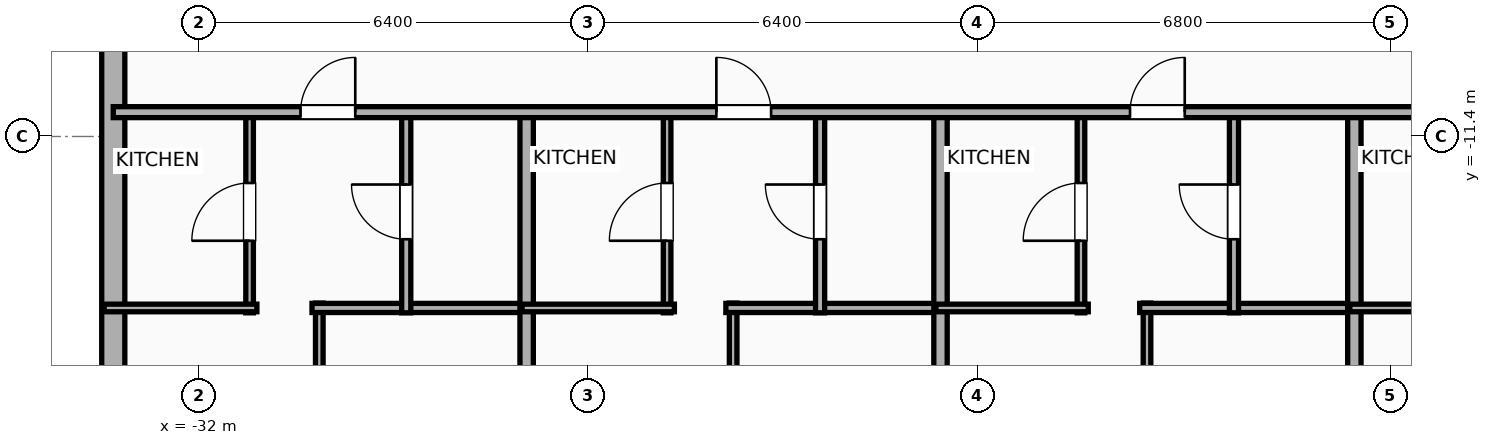
"""IFC4 building model, lengths in metres.
Left out: names, types, materials, properties, quantities, classifications, styles, units other than length and angle.
Written with IfcOpenShell. Run it as: python <this file> out.ifc"""

import sys

from ifc_helpers import new_model, si_unit, direction, frame, frame_2d, origin, place, context, subcontext, project, spatial, rectangle, extrude, element, fill, save


model = new_model("IFC4")
c1 = context("Model", 3, precision=1e-05, world=origin(), true_north=direction((0.0, 1.0)))
c2 = subcontext(c1, "Body", "Model", "MODEL_VIEW")
j1 = project(units=[si_unit("LENGTHUNIT", "METRE"), si_unit("PLANEANGLEUNIT", "RADIAN")], contexts=[c1])
p1 = place(None, origin())
s1 = spatial("IfcSite", under=j1, at=p1, CompositionType="ELEMENT")
p2 = place(p1, origin())
s2 = spatial("IfcBuilding", under=s1, at=p2, CompositionType="ELEMENT")
p3 = place(p2, frame((0.0, 0.0, 65.0)))
s3 = spatial("IfcBuildingStorey", under=s2, at=p3, CompositionType="ELEMENT", Elevation=65.0)
p4 = place(p3, frame((-33.41, -18.381, 0.0), z_axis=(0.0, 0.0, 1.0), x_axis=(0.0, 1.0, 0.0)))
e1 = element("IfcWall", 1, at=p4, inside=s3, PredefinedType="ELEMENTEDWALL", context=c2, shape_type="SweptSolid", body=[
    extrude(rectangle(XDim=36.763, YDim=0.38, at=frame_2d((18.381, 0.0))), origin(), (0.0, 0.0, 1.0), 3.65),
])
p5 = place(p4, frame((33.637, 0.0, 0.75)))
e2 = element("IfcOpeningElement", 2, at=p5, cuts=e1, PredefinedType="OPENING", context=c2, shape_type="SweptSolid", body=[
    extrude(rectangle(XDim=1.2, YDim=2.05, at=frame_2d((0.6, 1.025))), frame((0.0, 0.2, 0.0), z_axis=(0.0, -1.0, 0.0), x_axis=(1.0, 0.0, 0.0)), (0.0, 0.0, 1.0), 0.4),
])
p6 = place(p4, frame((22.576, 0.0, 0.75)))
e3 = element("IfcOpeningElement", 3, at=p6, cuts=e1, PredefinedType="OPENING", context=c2, shape_type="SweptSolid", body=[
    extrude(rectangle(XDim=1.2, YDim=2.05, at=frame_2d((0.6, 1.025))), frame((0.0, 0.2, 0.0), z_axis=(0.0, -1.0, 0.0), x_axis=(1.0, 0.0, 0.0)), (0.0, 0.0, 1.0), 0.4),
])
p7 = place(p4, frame((13.126, 0.0, 0.75)))
e4 = element("IfcOpeningElement", 4, at=p7, cuts=e1, PredefinedType="OPENING", context=c2, shape_type="SweptSolid", body=[
    extrude(rectangle(XDim=1.2, YDim=2.05, at=frame_2d((0.6, 1.025))), frame((0.0, 0.2, 0.0), z_axis=(0.0, -1.0, 0.0), x_axis=(1.0, 0.0, 0.0)), (0.0, 0.0, 1.0), 0.4),
])
p8 = place(p3, frame((-30.022, -22.275, 0.0), z_axis=(0.0, 0.0, 1.0), x_axis=(0.0, 1.0, 0.0)))
e5 = element("IfcWall", 5, at=p8, inside=s3, PredefinedType="PARTITIONING", context=c2, shape_type="SweptSolid", body=[
    extrude(rectangle(XDim=8.135, YDim=0.125, at=frame_2d((4.068, 0.0))), origin(), (0.0, 0.0, 1.0), 2.94),
])
p9 = place(p8, frame((5.733, 0.0, 0.0)))
e6 = element("IfcOpeningElement", 6, at=p9, cuts=e5, PredefinedType="OPENING", context=c2, shape_type="SweptSolid", body=[
    extrude(rectangle(XDim=0.9, YDim=2.05, at=frame_2d((0.45, 1.025))), frame((0.0, 0.073, 0.0), z_axis=(0.0, -1.0, 0.0), x_axis=(1.0, 0.0, 0.0)), (0.0, 0.0, 1.0), 0.145),
])
p10 = place(p3, frame((-30.142, -14.22, 0.0), z_axis=(0.0, 0.0, 1.0), x_axis=(1.0, 0.0, 0.0)))
e7 = element("IfcWall", 7, at=p10, inside=s3, PredefinedType="PLUMBINGWALL", context=c2, shape_type="SweptSolid", body=[
    extrude(rectangle(XDim=3.605, YDim=0.15, at=frame_2d((1.802, 0.0))), origin(), (0.0, 0.0, 1.0), 3.65),
])
p11 = place(p3, frame((-31.168, -14.3, 0.0), z_axis=(0.0, 0.0, 1.0), x_axis=(0.0, 1.0, 0.0)))
e8 = element("IfcWall", 8, at=p11, inside=s3, PredefinedType="PARTITIONING", context=c2, shape_type="SweptSolid", body=[
    extrude(rectangle(XDim=3.32, YDim=0.125, at=frame_2d((1.66, 0.0))), origin(), (0.0, 0.0, 1.0), 2.94),
])
p12 = place(p11, frame((1.185, 0.0, 0.0)))
e9 = element("IfcOpeningElement", 9, at=p12, cuts=e8, PredefinedType="OPENING", context=c2, shape_type="SweptSolid", body=[
    extrude(rectangle(XDim=0.95, YDim=2.05, at=frame_2d((0.475, 1.025))), frame((0.0, 0.073, 0.0), z_axis=(0.0, -1.0, 0.0), x_axis=(1.0, 0.0, 0.0)), (0.0, 0.0, 1.0), 0.145),
])
p13 = place(p3, frame((-33.56, -14.22, 0.0), z_axis=(0.0, 0.0, 1.0), x_axis=(1.0, 0.0, 0.0)))
e10 = element("IfcWall", 10, at=p13, inside=s3, PredefinedType="PARTITIONING", context=c2, shape_type="SweptSolid", body=[
    extrude(rectangle(XDim=2.512, YDim=0.125, at=frame_2d((1.256, 0.0))), origin(), (0.0, 0.0, 1.0), 3.65),
])
p14 = place(p3, frame((-28.592, -14.3, 0.0), z_axis=(0.0, 0.0, 1.0), x_axis=(0.0, 1.0, 0.0)))
e11 = element("IfcWall", 11, at=p14, inside=s3, PredefinedType="PLUMBINGWALL", context=c2, shape_type="SweptSolid", body=[
    extrude(rectangle(XDim=3.32, YDim=0.15, at=frame_2d((1.66, 0.0))), origin(), (0.0, 0.0, 1.0), 3.65),
])
p15 = place(p14, frame((1.21, 0.0, 0.0)))
e12 = element("IfcOpeningElement", 12, at=p15, cuts=e11, PredefinedType="OPENING", context=c2, shape_type="SweptSolid", body=[
    extrude(rectangle(XDim=0.9, YDim=2.05, at=frame_2d((0.45, 1.025))), frame((0.0, 0.085, 0.0), z_axis=(0.0, -1.0, 0.0), x_axis=(1.0, 0.0, 0.0)), (0.0, 0.0, 1.0), 0.17),
])
p16 = place(p3, frame((-26.612, -22.21, 0.0), z_axis=(0.0, 0.0, 1.0), x_axis=(0.0, 1.0, 0.0)))
e13 = element("IfcWall", 13, at=p16, inside=s3, PredefinedType="PARTITIONING", context=c2, shape_type="SweptSolid", body=[
    extrude(rectangle(XDim=11.29, YDim=0.22, at=frame_2d((5.645, 0.0))), origin(), (0.0, 0.0, 1.0), 3.65),
])
p17 = place(p3, frame((-23.216, -22.36, 0.0), z_axis=(0.0, 0.0, 1.0), x_axis=(0.0, 1.0, 0.0)))
e14 = element("IfcWall", 14, at=p17, inside=s3, PredefinedType="PARTITIONING", context=c2, shape_type="SweptSolid", body=[
    extrude(rectangle(XDim=8.22, YDim=0.125, at=frame_2d((4.11, 0.0))), origin(), (0.0, 0.0, 1.0), 3.65),
])
p18 = place(p17, frame((5.797, 0.0, 0.0)))
e15 = element("IfcOpeningElement", 15, at=p18, cuts=e14, PredefinedType="OPENING", context=c2, shape_type="SweptSolid", body=[
    extrude(rectangle(XDim=0.9, YDim=2.05, at=frame_2d((0.45, 1.025))), frame((0.0, 0.073, 0.0), z_axis=(0.0, -1.0, 0.0), x_axis=(1.0, 0.0, 0.0)), (0.0, 0.0, 1.0), 0.145),
])
p19 = place(p3, frame((-23.336, -14.22, 0.0), z_axis=(0.0, 0.0, 1.0), x_axis=(1.0, 0.0, 0.0)))
e16 = element("IfcWall", 16, at=p19, inside=s3, PredefinedType="PLUMBINGWALL", context=c2, shape_type="SweptSolid", body=[
    extrude(rectangle(XDim=3.605, YDim=0.15, at=frame_2d((1.802, 0.0))), origin(), (0.0, 0.0, 1.0), 3.65),
])
p20 = place(p3, frame((-24.302, -14.3, 0.0), z_axis=(0.0, 0.0, 1.0), x_axis=(0.0, 1.0, 0.0)))
e17 = element("IfcWall", 17, at=p20, inside=s3, PredefinedType="PARTITIONING", context=c2, shape_type="SweptSolid", body=[
    extrude(rectangle(XDim=3.32, YDim=0.125, at=frame_2d((1.66, 0.0))), origin(), (0.0, 0.0, 1.0), 3.65),
])
p21 = place(p20, frame((1.185, 0.0, 0.0)))
e18 = element("IfcOpeningElement", 18, at=p21, cuts=e17, PredefinedType="OPENING", context=c2, shape_type="SweptSolid", body=[
    extrude(rectangle(XDim=0.95, YDim=2.05, at=frame_2d((0.475, 1.025))), frame((0.0, 0.073, 0.0), z_axis=(0.0, -1.0, 0.0), x_axis=(1.0, 0.0, 0.0)), (0.0, 0.0, 1.0), 0.145),
])
p22 = place(p3, frame((-26.687, -14.22, 0.0), z_axis=(0.0, 0.0, 1.0), x_axis=(1.0, 0.0, 0.0)))
e19 = element("IfcWall", 19, at=p22, inside=s3, PredefinedType="PARTITIONING", context=c2, shape_type="SweptSolid", body=[
    extrude(rectangle(XDim=2.505, YDim=0.125, at=frame_2d((1.252, 0.0))), origin(), (0.0, 0.0, 1.0), 3.65),
])
p23 = place(p3, frame((-21.786, -14.3, 0.0), z_axis=(0.0, 0.0, 1.0), x_axis=(0.0, 1.0, 0.0)))
e20 = element("IfcWall", 20, at=p23, inside=s3, PredefinedType="PLUMBINGWALL", context=c2, shape_type="SweptSolid", body=[
    extrude(rectangle(XDim=3.32, YDim=0.15, at=frame_2d((1.66, 0.0))), origin(), (0.0, 0.0, 1.0), 3.65),
])
p24 = place(p23, frame((1.21, 0.0, 0.0)))
e21 = element("IfcOpeningElement", 21, at=p24, cuts=e20, PredefinedType="OPENING", context=c2, shape_type="SweptSolid", body=[
    extrude(rectangle(XDim=0.9, YDim=2.05, at=frame_2d((0.45, 1.025))), frame((0.0, 0.085, 0.0), z_axis=(0.0, -1.0, 0.0), x_axis=(1.0, 0.0, 0.0)), (0.0, 0.0, 1.0), 0.17),
])
p25 = place(p3, frame((-19.806, -22.21, 0.0), z_axis=(0.0, 0.0, 1.0), x_axis=(0.0, 1.0, 0.0)))
e22 = element("IfcWall", 22, at=p25, inside=s3, PredefinedType="PARTITIONING", context=c2, shape_type="SweptSolid", body=[
    extrude(rectangle(XDim=11.29, YDim=0.22, at=frame_2d((5.645, 0.0))), origin(), (0.0, 0.0, 1.0), 3.65),
])
p26 = place(p3, frame((-16.41, -22.36, 0.0), z_axis=(0.0, 0.0, 1.0), x_axis=(0.0, 1.0, 0.0)))
e23 = element("IfcWall", 23, at=p26, inside=s3, PredefinedType="PARTITIONING", context=c2, shape_type="SweptSolid", body=[
    extrude(rectangle(XDim=8.22, YDim=0.125, at=frame_2d((4.11, 0.0))), origin(), (0.0, 0.0, 1.0), 3.65),
])
p27 = place(p26, frame((5.797, 0.0, 0.0)))
e24 = element("IfcOpeningElement", 24, at=p27, cuts=e23, PredefinedType="OPENING", context=c2, shape_type="SweptSolid", body=[
    extrude(rectangle(XDim=0.9, YDim=2.05, at=frame_2d((0.45, 1.025))), frame((0.0, 0.073, 0.0), z_axis=(0.0, -1.0, 0.0), x_axis=(1.0, 0.0, 0.0)), (0.0, 0.0, 1.0), 0.145),
])
p28 = place(p3, frame((-16.53, -14.22, 0.0), z_axis=(0.0, 0.0, 1.0), x_axis=(1.0, 0.0, 0.0)))
e25 = element("IfcWall", 25, at=p28, inside=s3, PredefinedType="PLUMBINGWALL", context=c2, shape_type="SweptSolid", body=[
    extrude(rectangle(XDim=3.605, YDim=0.15, at=frame_2d((1.802, 0.0))), origin(), (0.0, 0.0, 1.0), 3.65),
])
p29 = place(p3, frame((-17.496, -14.3, 0.0), z_axis=(0.0, 0.0, 1.0), x_axis=(0.0, 1.0, 0.0)))
e26 = element("IfcWall", 26, at=p29, inside=s3, PredefinedType="PARTITIONING", context=c2, shape_type="SweptSolid", body=[
    extrude(rectangle(XDim=3.32, YDim=0.125, at=frame_2d((1.66, 0.0))), origin(), (0.0, 0.0, 1.0), 3.65),
])
p30 = place(p29, frame((1.185, 0.0, 0.0)))
e27 = element("IfcOpeningElement", 27, at=p30, cuts=e26, PredefinedType="OPENING", context=c2, shape_type="SweptSolid", body=[
    extrude(rectangle(XDim=0.95, YDim=2.05, at=frame_2d((0.475, 1.025))), frame((0.0, 0.073, 0.0), z_axis=(0.0, -1.0, 0.0), x_axis=(1.0, 0.0, 0.0)), (0.0, 0.0, 1.0), 0.145),
])
p31 = place(p3, frame((-19.881, -14.22, 0.0), z_axis=(0.0, 0.0, 1.0), x_axis=(1.0, 0.0, 0.0)))
e28 = element("IfcWall", 28, at=p31, inside=s3, PredefinedType="PARTITIONING", context=c2, shape_type="SweptSolid", body=[
    extrude(rectangle(XDim=2.505, YDim=0.125, at=frame_2d((1.252, 0.0))), origin(), (0.0, 0.0, 1.0), 3.65),
])
p32 = place(p3, frame((-14.98, -14.3, 0.0), z_axis=(0.0, 0.0, 1.0), x_axis=(0.0, 1.0, 0.0)))
e29 = element("IfcWall", 29, at=p32, inside=s3, PredefinedType="PLUMBINGWALL", context=c2, shape_type="SweptSolid", body=[
    extrude(rectangle(XDim=3.32, YDim=0.15, at=frame_2d((1.66, 0.0))), origin(), (0.0, 0.0, 1.0), 3.65),
])
p33 = place(p32, frame((1.21, 0.0, 0.0)))
e30 = element("IfcOpeningElement", 30, at=p33, cuts=e29, PredefinedType="OPENING", context=c2, shape_type="SweptSolid", body=[
    extrude(rectangle(XDim=0.9, YDim=2.05, at=frame_2d((0.45, 1.025))), frame((0.0, 0.085, 0.0), z_axis=(0.0, -1.0, 0.0), x_axis=(1.0, 0.0, 0.0)), (0.0, 0.0, 1.0), 0.17),
])
p34 = place(p3, frame((-13.0, -22.21, 0.0), z_axis=(0.0, 0.0, 1.0), x_axis=(0.0, 1.0, 0.0)))
e31 = element("IfcWall", 31, at=p34, inside=s3, PredefinedType="PARTITIONING", context=c2, shape_type="SweptSolid", body=[
    extrude(rectangle(XDim=11.29, YDim=0.22, at=frame_2d((5.645, 0.0))), origin(), (0.0, 0.0, 1.0), 3.65),
])
p35 = place(p3, frame((-13.075, -14.22, 0.0), z_axis=(0.0, 0.0, 1.0), x_axis=(1.0, 0.0, 0.0)))
e32 = element("IfcWall", 32, at=p35, inside=s3, PredefinedType="PARTITIONING", context=c2, shape_type="SweptSolid", body=[
    extrude(rectangle(XDim=2.505, YDim=0.125, at=frame_2d((1.252, 0.0))), origin(), (0.0, 0.0, 1.0), 3.65),
])
p36 = place(p3, frame((-33.41, -11.0, 0.0), z_axis=(0.0, 0.0, 1.0), x_axis=(1.0, 0.0, 0.0)))
e33 = element("IfcWall", 33, at=p36, inside=s3, PredefinedType="PARTITIONING", context=c2, shape_type="SweptSolid", body=[
    extrude(rectangle(XDim=59.62, YDim=0.18, at=frame_2d((29.81, 0.0))), origin(), (0.0, 0.0, 1.0), 3.65),
])
p37 = place(p36, frame((3.08, 0.0, 0.0)))
e34 = element("IfcOpeningElement", 34, at=p37, cuts=e33, PredefinedType="OPENING", context=c2, shape_type="SweptSolid", body=[
    extrude(rectangle(XDim=0.9, YDim=2.05, at=frame_2d((0.45, 1.025))), frame((0.0, 0.1, 0.0), z_axis=(0.0, -1.0, 0.0), x_axis=(1.0, 0.0, 0.0)), (0.0, 0.0, 1.0), 0.2),
])
p38 = place(p36, frame((9.918, 0.0, 0.0)))
e35 = element("IfcOpeningElement", 35, at=p38, cuts=e33, PredefinedType="OPENING", context=c2, shape_type="SweptSolid", body=[
    extrude(rectangle(XDim=0.9, YDim=2.05, at=frame_2d((0.45, 1.025))), frame((0.0, 0.1, 0.0), z_axis=(0.0, -1.0, 0.0), x_axis=(1.0, 0.0, 0.0)), (0.0, 0.0, 1.0), 0.2),
])
p39 = place(p36, frame((16.721, 0.0, 0.0)))
e36 = element("IfcOpeningElement", 36, at=p39, cuts=e33, PredefinedType="OPENING", context=c2, shape_type="SweptSolid", body=[
    extrude(rectangle(XDim=0.9, YDim=2.05, at=frame_2d((0.45, 1.025))), frame((0.0, 0.1, 0.0), z_axis=(0.0, -1.0, 0.0), x_axis=(1.0, 0.0, 0.0)), (0.0, 0.0, 1.0), 0.2),
])
p40 = place(p36, frame((23.625, 0.0, 0.0)))
e37 = element("IfcOpeningElement", 37, at=p40, cuts=e33, PredefinedType="OPENING", context=c2, shape_type="SweptSolid", body=[
    extrude(rectangle(XDim=0.9, YDim=2.05, at=frame_2d((0.45, 1.025))), frame((0.0, 0.1, 0.0), z_axis=(0.0, -1.0, 0.0), x_axis=(1.0, 0.0, 0.0)), (0.0, 0.0, 1.0), 0.2),
])
p41 = place(p36, frame((30.624, 0.0, 0.0)))
e38 = element("IfcOpeningElement", 38, at=p41, cuts=e33, PredefinedType="OPENING", context=c2, shape_type="SweptSolid", body=[
    extrude(rectangle(XDim=0.9, YDim=2.05, at=frame_2d((0.45, 1.025))), frame((0.0, 0.1, 0.0), z_axis=(0.0, -1.0, 0.0), x_axis=(1.0, 0.0, 0.0)), (0.0, 0.0, 1.0), 0.2),
])
p42 = place(p36, frame((37.623, 0.0, 0.0)))
e39 = element("IfcOpeningElement", 39, at=p42, cuts=e33, PredefinedType="OPENING", context=c2, shape_type="SweptSolid", body=[
    extrude(rectangle(XDim=0.9, YDim=2.05, at=frame_2d((0.45, 1.025))), frame((0.0, 0.1, 0.0), z_axis=(0.0, -1.0, 0.0), x_axis=(1.0, 0.0, 0.0)), (0.0, 0.0, 1.0), 0.2),
])
p43 = place(p36, frame((44.623, 0.0, 0.0)))
e40 = element("IfcOpeningElement", 40, at=p43, cuts=e33, PredefinedType="OPENING", context=c2, shape_type="SweptSolid", body=[
    extrude(rectangle(XDim=0.9, YDim=2.05, at=frame_2d((0.45, 1.025))), frame((0.0, 0.1, 0.0), z_axis=(0.0, -1.0, 0.0), x_axis=(1.0, 0.0, 0.0)), (0.0, 0.0, 1.0), 0.2),
])
p44 = place(p36, frame((49.565, 0.0, 0.0)))
e41 = element("IfcOpeningElement", 41, at=p44, cuts=e33, PredefinedType="OPENING", context=c2, shape_type="SweptSolid", body=[
    extrude(rectangle(XDim=1.15, YDim=2.05, at=frame_2d((0.575, 1.025))), frame((0.0, 0.1, 0.0), z_axis=(0.0, -1.0, 0.0), x_axis=(1.0, 0.0, 0.0)), (0.0, 0.0, 1.0), 0.2),
])
p45 = place(p36, frame((56.583, 0.0, 0.0)))
e42 = element("IfcOpeningElement", 42, at=p45, cuts=e33, PredefinedType="OPENING", context=c2, shape_type="SweptSolid", body=[
    extrude(rectangle(XDim=0.9, YDim=2.05, at=frame_2d((0.45, 1.025))), frame((0.0, 0.1, 0.0), z_axis=(0.0, -1.0, 0.0), x_axis=(1.0, 0.0, 0.0)), (0.0, 0.0, 1.0), 0.2),
])
p46 = place(p12, origin())
e43 = element("IfcDoor", 43, at=p46, inside=s3, OperationType="SINGLE_SWING_LEFT", PredefinedType="DOOR", context=c2, shape_type="SweptSolid", body=[
    extrude(rectangle(XDim=0.95, YDim=2.05, at=frame_2d((0.475, 1.025))), frame((0.0, 0.025, 0.0), z_axis=(0.0, -1.0, 0.0), x_axis=(1.0, 0.0, 0.0)), (0.0, 0.0, 1.0), 0.05),
])
fill(e9, e43)
p47 = place(p15, origin())
e44 = element("IfcDoor", 44, at=p47, inside=s3, OperationType="SINGLE_SWING_RIGHT", PredefinedType="DOOR", context=c2, shape_type="SweptSolid", body=[
    extrude(rectangle(XDim=0.9, YDim=2.05, at=frame_2d((0.45, 1.025))), frame((0.0, 0.025, 0.0), z_axis=(0.0, -1.0, 0.0), x_axis=(1.0, 0.0, 0.0)), (0.0, 0.0, 1.0), 0.05),
])
fill(e12, e44)
p48 = place(p21, origin())
e45 = element("IfcDoor", 45, at=p48, inside=s3, OperationType="SINGLE_SWING_LEFT", PredefinedType="DOOR", context=c2, shape_type="SweptSolid", body=[
    extrude(rectangle(XDim=0.95, YDim=2.05, at=frame_2d((0.475, 1.025))), frame((0.0, 0.025, 0.0), z_axis=(0.0, -1.0, 0.0), x_axis=(1.0, 0.0, 0.0)), (0.0, 0.0, 1.0), 0.05),
])
fill(e18, e45)
p49 = place(p24, origin())
e46 = element("IfcDoor", 46, at=p49, inside=s3, OperationType="SINGLE_SWING_RIGHT", PredefinedType="DOOR", context=c2, shape_type="SweptSolid", body=[
    extrude(rectangle(XDim=0.9, YDim=2.05, at=frame_2d((0.45, 1.025))), frame((0.0, 0.025, 0.0), z_axis=(0.0, -1.0, 0.0), x_axis=(1.0, 0.0, 0.0)), (0.0, 0.0, 1.0), 0.05),
])
fill(e21, e46)
p50 = place(p30, origin())
e47 = element("IfcDoor", 47, at=p50, inside=s3, OperationType="SINGLE_SWING_LEFT", PredefinedType="DOOR", context=c2, shape_type="SweptSolid", body=[
    extrude(rectangle(XDim=0.95, YDim=2.05, at=frame_2d((0.475, 1.025))), frame((0.0, 0.025, 0.0), z_axis=(0.0, -1.0, 0.0), x_axis=(1.0, 0.0, 0.0)), (0.0, 0.0, 1.0), 0.05),
])
fill(e27, e47)
p51 = place(p33, origin())
e48 = element("IfcDoor", 48, at=p51, inside=s3, OperationType="SINGLE_SWING_RIGHT", PredefinedType="DOOR", context=c2, shape_type="SweptSolid", body=[
    extrude(rectangle(XDim=0.9, YDim=2.05, at=frame_2d((0.45, 1.025))), frame((0.0, 0.025, 0.0), z_axis=(0.0, -1.0, 0.0), x_axis=(1.0, 0.0, 0.0)), (0.0, 0.0, 1.0), 0.05),
])
fill(e30, e48)
p52 = place(p37, origin())
e49 = element("IfcDoor", 49, at=p52, inside=s3, OperationType="SINGLE_SWING_RIGHT", PredefinedType="DOOR", context=c2, shape_type="SweptSolid", body=[
    extrude(rectangle(XDim=0.9, YDim=2.05, at=frame_2d((0.45, 1.025))), frame((0.0, 0.025, 0.0), z_axis=(0.0, -1.0, 0.0), x_axis=(1.0, 0.0, 0.0)), (0.0, 0.0, 1.0), 0.05),
])
fill(e34, e49)
p53 = place(p38, origin())
e50 = element("IfcDoor", 50, at=p53, inside=s3, OperationType="SINGLE_SWING_LEFT", PredefinedType="DOOR", context=c2, shape_type="SweptSolid", body=[
    extrude(rectangle(XDim=0.9, YDim=2.05, at=frame_2d((0.45, 1.025))), frame((0.0, 0.025, 0.0), z_axis=(0.0, -1.0, 0.0), x_axis=(1.0, 0.0, 0.0)), (0.0, 0.0, 1.0), 0.05),
])
fill(e35, e50)
p54 = place(p39, origin())
e51 = element("IfcDoor", 51, at=p54, inside=s3, OperationType="SINGLE_SWING_RIGHT", PredefinedType="DOOR", context=c2, shape_type="SweptSolid", body=[
    extrude(rectangle(XDim=0.9, YDim=2.05, at=frame_2d((0.45, 1.025))), frame((0.0, 0.025, 0.0), z_axis=(0.0, -1.0, 0.0), x_axis=(1.0, 0.0, 0.0)), (0.0, 0.0, 1.0), 0.05),
])
fill(e36, e51)
save(model, sys.argv[1])
